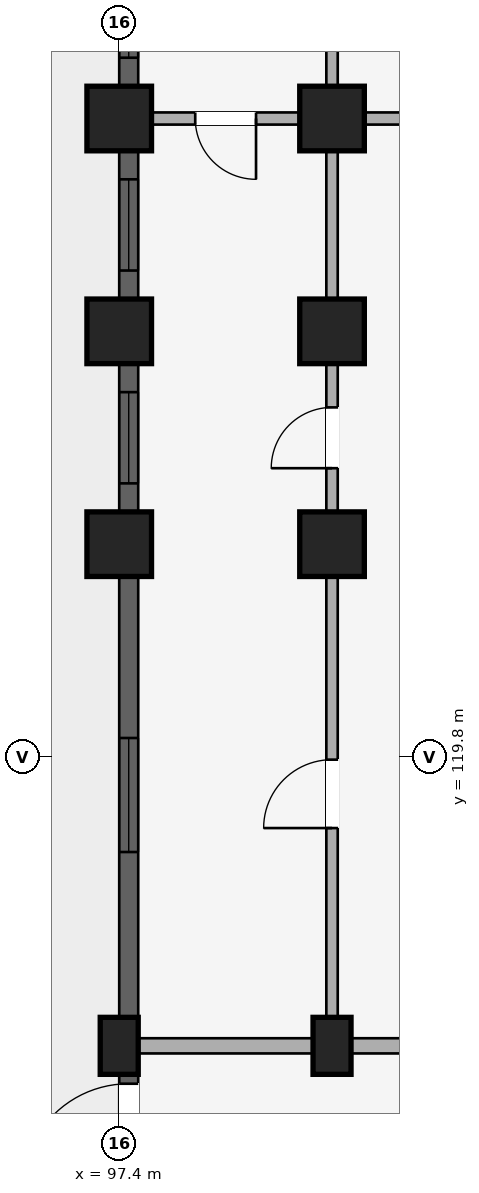
"""IFC4 building model, lengths in metres.
Left out: names, types, materials, properties, quantities, classifications, styles, units other than length and angle.
Written with IfcOpenShell. Run it as: python <this file> out.ifc"""

import sys

from ifc_helpers import new_model, si_unit, direction, frame, frame_2d, origin, origin_2d, place, context, subcontext, project, spatial, rectangle, extrude, element, fill, save


model = new_model("IFC4")
c1 = context("Model", 3, precision=1e-05, world=origin(), true_north=direction((0.0, 1.0)))
c2 = subcontext(c1, "Body", "Model", "MODEL_VIEW")
j1 = project(units=[si_unit("LENGTHUNIT", "METRE"), si_unit("PLANEANGLEUNIT", "RADIAN")], contexts=[c1])
p1 = place(None, origin())
s1 = spatial("IfcSite", under=j1, at=p1, CompositionType="ELEMENT")
p2 = place(p1, origin())
s2 = spatial("IfcBuilding", under=s1, at=p2, CompositionType="ELEMENT")
p3 = place(p2, origin())
s3 = spatial("IfcBuildingStorey", under=s2, at=p3, CompositionType="ELEMENT", Elevation=0.0)
p4 = place(p3, frame((100.2, 116.0, 0.0), z_axis=(0.0, 0.0, 1.0), x_axis=(1.0, 0.0, 0.0)))
e1 = element("IfcColumn", 1, at=p4, inside=s3, PredefinedType="COLUMN", context=c2, shape_type="SweptSolid", body=[
    extrude(rectangle(XDim=0.5, YDim=0.75, at=origin_2d()), origin(), (0.0, 0.0, 1.0), 4.15),
])
for number, where, z_axis, x_axis in (
    (2, (100.2, 122.6, 0.0), (0.0, 0.0, 1.0), (1.0, 0.0, 0.0)),
    (3, (100.2, 125.4, 0.0), (0.0, 0.0, 1.0), (1.0, 0.0, 0.0)),
    (4, (100.2, 128.2, 0.0), (0.0, 0.0, 1.0), (1.0, 0.0, 0.0)),
):
    element("IfcColumn", number, at=place(p3, frame(where, z_axis=z_axis, x_axis=x_axis)), inside=s3, PredefinedType="COLUMN", context=c2, shape_type="SweptSolid", body=[
        extrude(rectangle(XDim=0.85, YDim=0.85, at=origin_2d()), origin(), (0.0, 0.0, 1.0), 4.15),
    ])
p5 = place(p3, frame((97.4, 116.0, 0.0), z_axis=(0.0, 0.0, 1.0), x_axis=(1.0, 0.0, 0.0)))
e5 = element("IfcColumn", 5, at=p5, inside=s3, PredefinedType="COLUMN", context=c2, shape_type="SweptSolid", body=[
    extrude(rectangle(XDim=0.5, YDim=0.75, at=origin_2d()), origin(), (0.0, 0.0, 1.0), 4.15),
])
for number, where, z_axis, x_axis in (
    (6, (97.4, 122.6, 0.0), (0.0, 0.0, 1.0), (1.0, 0.0, 0.0)),
    (7, (97.4, 125.4, 0.0), (0.0, 0.0, 1.0), (1.0, 0.0, 0.0)),
    (8, (97.4, 128.2, 0.0), (0.0, 0.0, 1.0), (1.0, 0.0, 0.0)),
):
    element("IfcColumn", number, at=place(p3, frame(where, z_axis=z_axis, x_axis=x_axis)), inside=s3, PredefinedType="COLUMN", context=c2, shape_type="SweptSolid", body=[
        extrude(rectangle(XDim=0.85, YDim=0.85, at=origin_2d()), origin(), (0.0, 0.0, 1.0), 4.15),
    ])
p6 = place(p3, frame((103.0, 116.0, 0.0), z_axis=(0.0, 0.0, 1.0), x_axis=(-1.0, 0.0, 0.0)))
e9 = element("IfcWall", 9, at=p6, inside=s3, PredefinedType="STANDARD", context=c2, shape_type="SweptSolid", body=[
    extrude(rectangle(XDim=2.8, YDim=0.2, at=frame_2d((1.4, 0.0))), origin(), (0.0, 0.0, 1.0), 3.492),
])
p7 = place(p6, frame((0.9, 0.0, 0.0)))
e10 = element("IfcOpeningElement", 10, at=p7, cuts=e9, PredefinedType="OPENING", context=c2, shape_type="SweptSolid", body=[
    extrude(rectangle(XDim=1.0, YDim=2.15, at=frame_2d((0.5, 1.075))), frame((0.0, 0.11, 0.0), z_axis=(0.0, -1.0, 0.0), x_axis=(1.0, 0.0, 0.0)), (0.0, 0.0, 1.0), 0.22),
])
p8 = place(p3, frame((102.92, 128.2, 0.0), z_axis=(0.0, 0.0, 1.0), x_axis=(-1.0, 0.0, 0.0)))
e11 = element("IfcWall", 11, at=p8, inside=s3, PredefinedType="PLUMBINGWALL", context=c2, shape_type="SweptSolid", body=[
    extrude(rectangle(XDim=2.64, YDim=0.16, at=frame_2d((1.32, 0.0))), origin(), (0.0, 0.0, 1.0), 3.492),
])
p9 = place(p8, frame((0.87, 0.0, 0.0)))
e12 = element("IfcOpeningElement", 12, at=p9, cuts=e11, PredefinedType="OPENING", context=c2, shape_type="SweptSolid", body=[
    extrude(rectangle(XDim=0.9, YDim=2.1, at=frame_2d((0.45, 1.05))), frame((0.0, 0.09, 0.0), z_axis=(0.0, -1.0, 0.0), x_axis=(1.0, 0.0, 0.0)), (0.0, 0.0, 1.0), 0.18),
])
p10 = place(p3, frame((100.2, 116.0, 0.0), z_axis=(0.0, 0.0, 1.0), x_axis=(-1.0, 0.0, 0.0)))
e13 = element("IfcWall", 13, at=p10, inside=s3, PredefinedType="STANDARD", context=c2, shape_type="SweptSolid", body=[
    extrude(rectangle(XDim=2.8, YDim=0.2, at=frame_2d((1.4, 0.0))), origin(), (0.0, 0.0, 1.0), 3.492),
])
p11 = place(p3, frame((100.12, 128.2, 0.0), z_axis=(0.0, 0.0, 1.0), x_axis=(-1.0, 0.0, 0.0)))
e14 = element("IfcWall", 14, at=p11, inside=s3, PredefinedType="PLUMBINGWALL", context=c2, shape_type="SweptSolid", body=[
    extrude(rectangle(XDim=2.64, YDim=0.16, at=frame_2d((1.32, 0.0))), origin(), (0.0, 0.0, 1.0), 3.492),
])
p12 = place(p11, frame((0.92, 0.0, 0.0)))
e15 = element("IfcOpeningElement", 15, at=p12, cuts=e14, PredefinedType="OPENING", context=c2, shape_type="SweptSolid", body=[
    extrude(rectangle(XDim=0.8, YDim=2.1, at=frame_2d((0.4, 1.05))), frame((0.0, 0.09, 0.0), z_axis=(0.0, -1.0, 0.0), x_axis=(1.0, 0.0, 0.0)), (0.0, 0.0, 1.0), 0.18),
])
p13 = place(p3, frame((100.2, 116.05, 0.0), z_axis=(0.0, 0.0, 1.0), x_axis=(0.0, 1.0, 0.0)))
e16 = element("IfcWall", 16, at=p13, inside=s3, PredefinedType="PARTITIONING", context=c2, shape_type="SweptSolid", body=[
    extrude(rectangle(XDim=6.53, YDim=0.15, at=frame_2d((3.265, 0.0))), origin(), (0.0, 0.0, 1.0), 3.492),
])
p14 = place(p13, frame((2.815, 0.0, 0.0)))
e17 = element("IfcOpeningElement", 17, at=p14, cuts=e16, PredefinedType="OPENING", context=c2, shape_type="SweptSolid", body=[
    extrude(rectangle(XDim=0.9, YDim=2.1, at=frame_2d((0.45, 1.05))), frame((0.0, 0.085, 0.0), z_axis=(0.0, -1.0, 0.0), x_axis=(1.0, 0.0, 0.0)), (0.0, 0.0, 1.0), 0.17),
])
p15 = place(p3, frame((100.2, 122.7, 0.0), z_axis=(0.0, 0.0, 1.0), x_axis=(0.0, 1.0, 0.0)))
e18 = element("IfcWall", 18, at=p15, inside=s3, PredefinedType="PARTITIONING", context=c2, shape_type="SweptSolid", body=[
    extrude(rectangle(XDim=10.82, YDim=0.15, at=frame_2d((5.41, 0.0))), origin(), (0.0, 0.0, 1.0), 3.492),
])
p16 = place(p15, frame((0.899, 0.0, 0.0)))
e19 = element("IfcOpeningElement", 19, at=p16, cuts=e18, PredefinedType="OPENING", context=c2, shape_type="SweptSolid", body=[
    extrude(rectangle(XDim=0.8, YDim=2.1, at=frame_2d((0.4, 1.05))), frame((0.0, 0.085, 0.0), z_axis=(0.0, -1.0, 0.0), x_axis=(1.0, 0.0, 0.0)), (0.0, 0.0, 1.0), 0.17),
])
p17 = place(p3, frame((97.525, 113.979, 0.0), z_axis=(0.0, 0.0, 1.0), x_axis=(0.0, 1.0, 0.0)))
e20 = element("IfcWall", 20, at=p17, inside=s3, PredefinedType="STANDARD", context=c2, shape_type="SweptSolid", body=[
    extrude(rectangle(XDim=1.643, YDim=0.25, at=frame_2d((0.822, 0.0))), origin(), (0.0, 0.0, 1.0), 3.492),
])
p18 = place(p17, frame((0.123, 0.0, 0.0)))
e21 = element("IfcOpeningElement", 21, at=p18, cuts=e20, PredefinedType="OPENING", context=c2, shape_type="SweptSolid", body=[
    extrude(rectangle(XDim=1.4, YDim=2.15, at=frame_2d((0.7, 1.075))), frame((0.0, 0.135, 0.0), z_axis=(0.0, -1.0, 0.0), x_axis=(1.0, 0.0, 0.0)), (0.0, 0.0, 1.0), 0.27),
])
p19 = place(p3, frame((97.525, 116.378, 0.0), z_axis=(0.0, 0.0, 1.0), x_axis=(0.0, 1.0, 0.0)))
e22 = element("IfcWall", 22, at=p19, inside=s3, PredefinedType="STANDARD", context=c2, shape_type="SweptSolid", body=[
    extrude(rectangle(XDim=5.802, YDim=0.25, at=frame_2d((2.901, 0.0))), origin(), (0.0, 0.0, 1.0), 3.492),
])
p20 = place(p19, frame((2.171, 0.0, 0.88)))
e23 = element("IfcOpeningElement", 23, at=p20, cuts=e22, PredefinedType="OPENING", context=c2, shape_type="SweptSolid", body=[
    extrude(rectangle(XDim=1.5, YDim=1.65, at=frame_2d((0.75, 0.825))), frame((0.0, 0.135, 0.0), z_axis=(0.0, -1.0, 0.0), x_axis=(1.0, 0.0, 0.0)), (0.0, 0.0, 1.0), 0.27),
])
p21 = place(p3, frame((97.525, 123.02, 0.0), z_axis=(0.0, 0.0, 1.0), x_axis=(0.0, 1.0, 0.0)))
e24 = element("IfcWall", 24, at=p21, inside=s3, PredefinedType="STANDARD", context=c2, shape_type="SweptSolid", body=[
    extrude(rectangle(XDim=1.96, YDim=0.25, at=frame_2d((0.98, 0.0))), origin(), (0.0, 0.0, 1.0), 3.492),
])
p22 = place(p21, frame((0.38, 0.0, 0.88)))
e25 = element("IfcOpeningElement", 25, at=p22, cuts=e24, PredefinedType="OPENING", context=c2, shape_type="SweptSolid", body=[
    extrude(rectangle(XDim=1.2, YDim=1.5, at=frame_2d((0.6, 0.75))), frame((0.0, 0.135, 0.0), z_axis=(0.0, -1.0, 0.0), x_axis=(1.0, 0.0, 0.0)), (0.0, 0.0, 1.0), 0.27),
])
p23 = place(p3, frame((97.525, 125.82, 0.0), z_axis=(0.0, 0.0, 1.0), x_axis=(0.0, 1.0, 0.0)))
e26 = element("IfcWall", 26, at=p23, inside=s3, PredefinedType="STANDARD", context=c2, shape_type="SweptSolid", body=[
    extrude(rectangle(XDim=1.96, YDim=0.25, at=frame_2d((0.98, 0.0))), origin(), (0.0, 0.0, 1.0), 3.492),
])
p24 = place(p23, frame((0.38, 0.0, 0.88)))
e27 = element("IfcOpeningElement", 27, at=p24, cuts=e26, PredefinedType="OPENING", context=c2, shape_type="SweptSolid", body=[
    extrude(rectangle(XDim=1.2, YDim=1.5, at=frame_2d((0.6, 0.75))), frame((0.0, 0.135, 0.0), z_axis=(0.0, -1.0, 0.0), x_axis=(1.0, 0.0, 0.0)), (0.0, 0.0, 1.0), 0.27),
])
p25 = place(p3, frame((97.525, 128.62, 0.0), z_axis=(0.0, 0.0, 1.0), x_axis=(0.0, 1.0, 0.0)))
e28 = element("IfcWall", 28, at=p25, inside=s3, PredefinedType="STANDARD", context=c2, shape_type="SweptSolid", body=[
    extrude(rectangle(XDim=1.96, YDim=0.25, at=frame_2d((0.98, 0.0))), origin(), (0.0, 0.0, 1.0), 3.492),
])
p26 = place(p25, frame((0.38, 0.0, 0.88)))
e29 = element("IfcOpeningElement", 29, at=p26, cuts=e28, PredefinedType="OPENING", context=c2, shape_type="SweptSolid", body=[
    extrude(rectangle(XDim=1.2, YDim=1.5, at=frame_2d((0.6, 0.75))), frame((0.0, 0.135, 0.0), z_axis=(0.0, -1.0, 0.0), x_axis=(1.0, 0.0, 0.0)), (0.0, 0.0, 1.0), 0.27),
])
p27 = place(p20, origin())
e30 = element("IfcWindow", 30, at=p27, inside=s3, PartitioningType="DOUBLE_PANEL_VERTICAL", PredefinedType="WINDOW", context=c2, shape_type="SweptSolid", body=[
    extrude(rectangle(XDim=1.5, YDim=1.65, at=frame_2d((0.75, 0.825))), frame((0.0, 0.03, 0.0), z_axis=(0.0, -1.0, 0.0), x_axis=(1.0, 0.0, 0.0)), (0.0, 0.0, 1.0), 0.06),
])
fill(e23, e30)
p28 = place(p22, origin())
e31 = element("IfcWindow", 31, at=p28, inside=s3, PartitioningType="SINGLE_PANEL", PredefinedType="WINDOW", context=c2, shape_type="SweptSolid", body=[
    extrude(rectangle(XDim=1.2, YDim=1.5, at=frame_2d((0.6, 0.75))), frame((0.0, 0.03, 0.0), z_axis=(0.0, -1.0, 0.0), x_axis=(1.0, 0.0, 0.0)), (0.0, 0.0, 1.0), 0.06),
])
fill(e25, e31)
p29 = place(p24, origin())
e32 = element("IfcWindow", 32, at=p29, inside=s3, PartitioningType="SINGLE_PANEL", PredefinedType="WINDOW", context=c2, shape_type="SweptSolid", body=[
    extrude(rectangle(XDim=1.2, YDim=1.5, at=frame_2d((0.6, 0.75))), frame((0.0, 0.03, 0.0), z_axis=(0.0, -1.0, 0.0), x_axis=(1.0, 0.0, 0.0)), (0.0, 0.0, 1.0), 0.06),
])
fill(e27, e32)
p30 = place(p26, origin())
e33 = element("IfcWindow", 33, at=p30, inside=s3, PartitioningType="SINGLE_PANEL", PredefinedType="WINDOW", context=c2, shape_type="SweptSolid", body=[
    extrude(rectangle(XDim=1.2, YDim=1.5, at=frame_2d((0.6, 0.75))), frame((0.0, 0.03, 0.0), z_axis=(0.0, -1.0, 0.0), x_axis=(1.0, 0.0, 0.0)), (0.0, 0.0, 1.0), 0.06),
])
fill(e29, e33)
p31 = place(p12, origin())
e34 = element("IfcDoor", 34, at=p31, inside=s3, OperationType="SINGLE_SWING_LEFT", PredefinedType="DOOR", context=c2, shape_type="SweptSolid", body=[
    extrude(rectangle(XDim=0.8, YDim=2.1, at=frame_2d((0.4, 1.05))), frame((0.0, 0.025, 0.0), z_axis=(0.0, -1.0, 0.0), x_axis=(1.0, 0.0, 0.0)), (0.0, 0.0, 1.0), 0.05),
])
fill(e15, e34)
p32 = place(p14, origin())
e35 = element("IfcDoor", 35, at=p32, inside=s3, OperationType="SINGLE_SWING_LEFT", PredefinedType="DOOR", context=c2, shape_type="SweptSolid", body=[
    extrude(rectangle(XDim=0.9, YDim=2.1, at=frame_2d((0.45, 1.05))), frame((0.0, 0.025, 0.0), z_axis=(0.0, -1.0, 0.0), x_axis=(1.0, 0.0, 0.0)), (0.0, 0.0, 1.0), 0.05),
])
fill(e17, e35)
p33 = place(p16, frame((0.8, 0.0, 0.0), z_axis=(0.0, 0.0, 1.0), x_axis=(-1.0, 0.0, 0.0)))
e36 = element("IfcDoor", 36, at=p33, inside=s3, OperationType="SINGLE_SWING_RIGHT", PredefinedType="DOOR", context=c2, shape_type="SweptSolid", body=[
    extrude(rectangle(XDim=0.8, YDim=2.1, at=frame_2d((0.4, 1.05))), frame((0.0, 0.025, 0.0), z_axis=(0.0, -1.0, 0.0), x_axis=(1.0, 0.0, 0.0)), (0.0, 0.0, 1.0), 0.05),
])
fill(e19, e36)
p34 = place(p18, origin())
e37 = element("IfcDoor", 37, at=p34, inside=s3, OperationType="SINGLE_SWING_LEFT", PredefinedType="DOOR", context=c2, shape_type="SweptSolid", body=[
    extrude(rectangle(XDim=1.4, YDim=2.15, at=frame_2d((0.7, 1.075))), frame((0.0, 0.025, 0.0), z_axis=(0.0, -1.0, 0.0), x_axis=(1.0, 0.0, 0.0)), (0.0, 0.0, 1.0), 0.05),
])
fill(e21, e37)
save(model, sys.argv[1])
